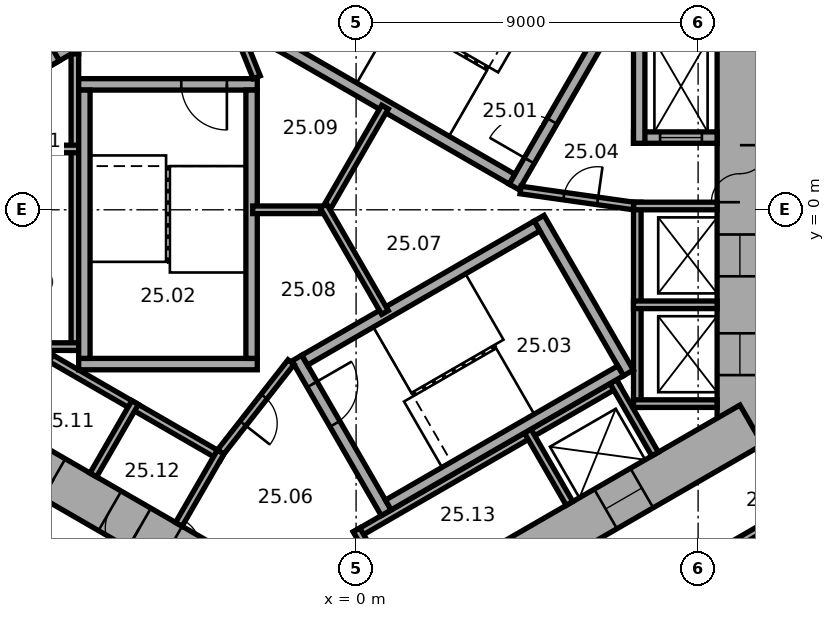
"""IFC4 building model, lengths in metres.
Left out: names, types, materials, properties, quantities, classifications, styles, units other than length and angle.
Written with IfcOpenShell. Run it as: python <this file> out.ifc"""

import sys

from ifc_helpers import new_model, si_unit, direction, frame, frame_2d, origin, place, context, subcontext, project, spatial, rectangle, extrude, element, fill, save


model = new_model("IFC4")
c1 = context("Model", 3, precision=1e-05, world=origin(), true_north=direction((0.0, 1.0)))
c2 = subcontext(c1, "Body", "Model", "MODEL_VIEW")
j1 = project(units=[si_unit("LENGTHUNIT", "METRE"), si_unit("PLANEANGLEUNIT", "RADIAN")], contexts=[c1])
p1 = place(None, origin())
s1 = spatial("IfcSite", under=j1, at=p1, CompositionType="ELEMENT")
p2 = place(p1, origin())
s2 = spatial("IfcBuilding", under=s1, at=p2, CompositionType="ELEMENT")
p3 = place(p2, frame((0.0, 0.0, 106.7)))
s3 = spatial("IfcBuildingStorey", under=s2, at=p3, CompositionType="ELEMENT", Elevation=106.7)
p4 = place(p3, frame((10.1, -6.177, 0.0), z_axis=(0.0, 0.0, 1.0), x_axis=(0.0, 1.0, 0.0)))
e1 = element("IfcWall", 1, at=p4, inside=s3, PredefinedType="SHEAR", context=c2, shape_type="SweptSolid", body=[
    extrude(rectangle(XDim=12.355, YDim=1.2, at=frame_2d((6.177, 0.0))), origin(), (0.0, 0.0, 1.0), 3.3),
])
p5 = place(p4, frame((6.378, 0.0, 0.0)))
e2 = element("IfcOpeningElement", 2, at=p5, cuts=e1, PredefinedType="OPENING", context=c2, shape_type="SweptSolid", body=[
    extrude(rectangle(XDim=1.5, YDim=2.1, at=frame_2d((0.75, 1.05))), frame((0.0, 0.61, 0.0), z_axis=(0.0, -1.0, 0.0), x_axis=(1.0, 0.0, 0.0)), (0.0, 0.0, 1.0), 1.22),
])
p6 = place(p4, frame((1.828, 0.0, 0.0)))
e3 = element("IfcOpeningElement", 3, at=p6, cuts=e1, PredefinedType="OPENING", context=c2, shape_type="SweptSolid", body=[
    extrude(rectangle(XDim=1.1, YDim=2.1, at=frame_2d((0.55, 1.05))), frame((0.0, 0.61, 0.0), z_axis=(0.0, -1.0, 0.0), x_axis=(1.0, 0.0, 0.0)), (0.0, 0.0, 1.0), 1.22),
])
p7 = place(p4, frame((4.427, 0.0, 0.0)))
e4 = element("IfcOpeningElement", 4, at=p7, cuts=e1, PredefinedType="OPENING", context=c2, shape_type="SweptSolid", body=[
    extrude(rectangle(XDim=1.1, YDim=2.1, at=frame_2d((0.55, 1.05))), frame((0.0, 0.61, 0.0), z_axis=(0.0, -1.0, 0.0), x_axis=(1.0, 0.0, 0.0)), (0.0, 0.0, 1.0), 1.22),
])
p8 = place(p3, frame((-10.4, -5.658, 0.0), z_axis=(0.0, 0.0, 1.0), x_axis=(0.866021384402, -0.500006961711, 0.0)))
e5 = element("IfcWall", 5, at=p8, inside=s3, PredefinedType="SHEAR", context=c2, shape_type="SweptSolid", body=[
    extrude(rectangle(XDim=12.355, YDim=1.2, at=frame_2d((6.178, 0.0))), origin(), (0.0, 0.0, 1.0), 3.3),
])
p9 = place(p8, frame((6.378, 0.0, 0.0)))
e6 = element("IfcOpeningElement", 6, at=p9, cuts=e5, PredefinedType="OPENING", context=c2, shape_type="SweptSolid", body=[
    extrude(rectangle(XDim=1.5, YDim=2.1, at=frame_2d((0.75, 1.05))), frame((0.0, 0.61, 0.0), z_axis=(0.0, -1.0, 0.0), x_axis=(1.0, 0.0, 0.0)), (0.0, 0.0, 1.0), 1.22),
])
p10 = place(p8, frame((1.928, 0.0, 0.0)))
e7 = element("IfcOpeningElement", 7, at=p10, cuts=e5, PredefinedType="OPENING", context=c2, shape_type="SweptSolid", body=[
    extrude(rectangle(XDim=0.9, YDim=2.1, at=frame_2d((0.45, 1.05))), frame((0.0, 0.61, 0.0), z_axis=(0.0, -1.0, 0.0), x_axis=(1.0, 0.0, 0.0)), (0.0, 0.0, 1.0), 1.22),
])
p11 = place(p8, frame((4.528, 0.0, 0.0)))
e8 = element("IfcOpeningElement", 8, at=p11, cuts=e5, PredefinedType="OPENING", context=c2, shape_type="SweptSolid", body=[
    extrude(rectangle(XDim=0.9, YDim=2.1, at=frame_2d((0.45, 1.05))), frame((0.0, 0.61, 0.0), z_axis=(0.0, -1.0, 0.0), x_axis=(1.0, 0.0, 0.0)), (0.0, 0.0, 1.0), 1.22),
])
p12 = place(p3, frame((-0.3, -11.836, 0.0), z_axis=(0.0, 0.0, 1.0), x_axis=(0.866021384402, 0.500006961711, 0.0)))
e9 = element("IfcWall", 9, at=p12, inside=s3, PredefinedType="SHEAR", context=c2, shape_type="SweptSolid", body=[
    extrude(rectangle(XDim=12.355, YDim=1.2, at=frame_2d((6.178, 0.0))), origin(), (0.0, 0.0, 1.0), 3.3),
])
p13 = place(p12, frame((4.128, 0.0, 0.0)))
e10 = element("IfcOpeningElement", 10, at=p13, cuts=e9, PredefinedType="OPENING", context=c2, shape_type="SweptSolid", body=[
    extrude(rectangle(XDim=0.9, YDim=2.1, at=frame_2d((0.45, 1.05))), frame((0.0, 0.61, 0.0), z_axis=(0.0, -1.0, 0.0), x_axis=(1.0, 0.0, 0.0)), (0.0, 0.0, 1.0), 1.22),
])
p14 = place(p12, frame((7.928, 0.0, 0.0)))
e11 = element("IfcOpeningElement", 11, at=p14, cuts=e9, PredefinedType="OPENING", context=c2, shape_type="SweptSolid", body=[
    extrude(rectangle(XDim=1.1, YDim=2.1, at=frame_2d((0.55, 1.05))), frame((0.0, 0.61, 0.0), z_axis=(0.0, -1.0, 0.0), x_axis=(1.0, 0.0, 0.0)), (0.0, 0.0, 1.0), 1.22),
])
p15 = place(p3, frame((7.4, -5.2, 0.0), z_axis=(0.0, 0.0, 1.0), x_axis=(0.0, 1.0, 0.0)))
e12 = element("IfcWall", 12, at=p15, inside=s3, PredefinedType="PARTITIONING", context=c2, shape_type="SweptSolid", body=[
    extrude(rectangle(XDim=5.4, YDim=0.2, at=frame_2d((2.7, 0.0))), origin(), (0.0, 0.0, 1.0), 3.05),
])
for number, where, z_axis, x_axis in (
    (13, (7.3, -5.1, 0.0), (0.0, 0.0, 1.0), (1.0, 0.0, 0.0)),
    (14, (7.3, -2.5, 0.0), (0.0, 0.0, 1.0), (1.0, 0.0, 0.0)),
    (15, (7.3, 0.1, 0.0), (0.0, 0.0, 1.0), (1.0, 0.0, 0.0)),
):
    element("IfcWall", number, at=place(p3, frame(where, z_axis=z_axis, x_axis=x_axis)), inside=s3, PredefinedType="PARTITIONING", context=c2, shape_type="SweptSolid", body=[
        extrude(rectangle(XDim=2.2, YDim=0.2, at=frame_2d((1.1, 0.0))), origin(), (0.0, 0.0, 1.0), 3.05),
    ])
p16 = place(p3, frame((-7.4, 4.3, 0.0), z_axis=(0.0, 0.0, 1.0), x_axis=(0.0, -1.0, 0.0)))
e16 = element("IfcWall", 16, at=p16, inside=s3, PredefinedType="PARTITIONING", context=c2, shape_type="SweptSolid", body=[
    extrude(rectangle(XDim=8.0, YDim=0.2, at=frame_2d((4.0, 0.0))), origin(), (0.0, 0.0, 1.0), 3.05),
])
for number, where, z_axis, x_axis in (
    (17, (-7.3, 4.2, 0.0), (0.0, 0.0, 1.0), (-1.0, 0.0, 0.0)),
    (18, (-7.3, 1.6, 0.0), (0.0, 0.0, 1.0), (-1.0, 0.0, 0.0)),
    (19, (-7.3, -3.6, 0.0), (0.0, 0.0, 1.0), (-1.0, 0.0, 0.0)),
):
    element("IfcWall", number, at=place(p3, frame(where, z_axis=z_axis, x_axis=x_axis)), inside=s3, PredefinedType="PARTITIONING", context=c2, shape_type="SweptSolid", body=[
        extrude(rectangle(XDim=2.2, YDim=0.2, at=frame_2d((1.1, 0.0))), origin(), (0.0, 0.0, 1.0), 3.05),
    ])
p17 = place(p3, frame((-8.203, -3.809, 0.0), z_axis=(0.0, 0.0, 1.0), x_axis=(0.866028230842, -0.499995103361, 0.0)))
e20 = element("IfcWall", 20, at=p17, inside=s3, PredefinedType="PARTITIONING", context=c2, shape_type="SweptSolid", body=[
    extrude(rectangle(XDim=5.4, YDim=0.2, at=frame_2d((2.7, 0.0))), origin(), (0.0, 0.0, 1.0), 3.05),
])
for number, where, z_axis, x_axis in (
    (21, (-8.067, -3.772, 0.0), (0.0, 0.0, 1.0), (-0.5, -0.866, 0.0)),
    (22, (-5.815, -5.072, 0.0), (0.0, 0.0, 1.0), (-0.5, -0.866, 0.0)),
):
    element("IfcWall", number, at=place(p3, frame(where, z_axis=z_axis, x_axis=x_axis)), inside=s3, PredefinedType="PARTITIONING", context=c2, shape_type="SweptSolid", body=[
        extrude(rectangle(XDim=2.2, YDim=0.2, at=frame_2d((1.1, 0.0))), origin(), (0.0, 0.0, 1.0), 3.05),
    ])
p18 = place(p3, frame((-3.563, -6.372, 0.0), z_axis=(0.0, 0.0, 1.0), x_axis=(-0.499994660107, -0.866028486751, 0.0)))
e23 = element("IfcWall", 23, at=p18, inside=s3, PredefinedType="PARTITIONING", context=c2, shape_type="SweptSolid", body=[
    extrude(rectangle(XDim=2.2, YDim=0.2, at=frame_2d((1.1, 0.0))), origin(), (0.0, 0.0, 1.0), 3.05),
])
p19 = place(p3, frame((-0.024, -8.559, 0.0), z_axis=(0.0, 0.0, 1.0), x_axis=(0.866026010844, 0.49999894854, 0.0)))
e24 = element("IfcWall", 24, at=p19, inside=s3, PredefinedType="PARTITIONING", context=c2, shape_type="SweptSolid", body=[
    extrude(rectangle(XDim=8.0, YDim=0.2, at=frame_2d((4.0, 0.0))), origin(), (0.0, 0.0, 1.0), 3.05),
])
for number, where, z_axis, x_axis in (
    (25, (0.013, -8.422, 0.0), (0.0, 0.0, 1.0), (0.5, -0.866, 0.0)),
    (26, (4.516, -5.822, 0.0), (0.0, 0.0, 1.0), (0.5, -0.866, 0.0)),
    (27, (6.768, -4.522, 0.0), (0.0, 0.0, 1.0), (0.5, -0.866, 0.0)),
):
    element("IfcWall", number, at=place(p3, frame(where, z_axis=z_axis, x_axis=x_axis)), inside=s3, PredefinedType="PARTITIONING", context=c2, shape_type="SweptSolid", body=[
        extrude(rectangle(XDim=2.2, YDim=0.2, at=frame_2d((1.1, 0.0))), origin(), (0.0, 0.0, 1.0), 3.05),
    ])
p20 = place(p3, frame((4.158, 0.602, 0.0), z_axis=(0.0, 0.0, 1.0), x_axis=(0.499977259774, 0.866038532462, 0.0)))
e28 = element("IfcWall", 28, at=p20, inside=s3, PredefinedType="SHEAR", context=c2, shape_type="SweptSolid", body=[
    extrude(rectangle(XDim=4.7, YDim=0.3, at=frame_2d((2.35, 0.0))), origin(), (0.0, 0.0, 1.0), 3.05),
])
p21 = place(p20, frame((0.8, 0.0, 0.0)))
e29 = element("IfcOpeningElement", 29, at=p21, cuts=e28, PredefinedType="OPENING", context=c2, shape_type="SweptSolid", body=[
    extrude(rectangle(XDim=1.2, YDim=2.1, at=frame_2d((0.6, 1.05))), frame((0.0, 0.16, 0.0), z_axis=(0.0, -1.0, 0.0), x_axis=(1.0, 0.0, 0.0)), (0.0, 0.0, 1.0), 0.32),
])
p22 = place(p3, frame((4.103, 0.807, 0.0), z_axis=(0.0, 0.0, 1.0), x_axis=(-0.866027801685, 0.499995846692, 0.0)))
e30 = element("IfcWall", 30, at=p22, inside=s3, PredefinedType="SHEAR", context=c2, shape_type="SweptSolid", body=[
    extrude(rectangle(XDim=7.06, YDim=0.3, at=frame_2d((3.53, 0.0))), origin(), (0.0, 0.0, 1.0), 3.05),
])
p23 = place(p3, frame((-2.6, 3.3, 0.0), z_axis=(0.0, 0.0, 1.0), x_axis=(-1.0, 0.0, 0.0)))
e31 = element("IfcWall", 31, at=p23, inside=s3, PredefinedType="SHEAR", context=c2, shape_type="SweptSolid", body=[
    extrude(rectangle(XDim=4.7, YDim=0.3, at=frame_2d((2.35, 0.0))), origin(), (0.0, 0.0, 1.0), 3.05),
])
p24 = place(p23, frame((0.8, 0.0, 0.0)))
e32 = element("IfcOpeningElement", 32, at=p24, cuts=e31, PredefinedType="OPENING", context=c2, shape_type="SweptSolid", body=[
    extrude(rectangle(XDim=1.2, YDim=2.1, at=frame_2d((0.6, 1.05))), frame((0.0, 0.16, 0.0), z_axis=(0.0, -1.0, 0.0), x_axis=(1.0, 0.0, 0.0)), (0.0, 0.0, 1.0), 0.32),
])
p25 = place(p3, frame((-2.6, -4.06, 0.0), z_axis=(0.0, 0.0, 1.0), x_axis=(-1.0, 0.0, 0.0)))
e33 = element("IfcWall", 33, at=p25, inside=s3, PredefinedType="SHEAR", context=c2, shape_type="SweptSolid", body=[
    extrude(rectangle(XDim=4.7, YDim=0.3, at=frame_2d((2.35, 0.0))), origin(), (0.0, 0.0, 1.0), 3.05),
])
for number, where, z_axis, x_axis in (
    (34, (-2.75, 3.15, 0.0), (0.0, 0.0, 1.0), (0.0, -1.0, 0.0)),
    (35, (-7.15, 3.15, 0.0), (0.0, 0.0, 1.0), (0.0, -1.0, 0.0)),
):
    element("IfcWall", number, at=place(p3, frame(where, z_axis=z_axis, x_axis=x_axis)), inside=s3, PredefinedType="SHEAR", context=c2, shape_type="SweptSolid", body=[
        extrude(rectangle(XDim=7.06, YDim=0.3, at=frame_2d((3.53, 0.0))), origin(), (0.0, 0.0, 1.0), 3.05),
    ])
p26 = place(p3, frame((-1.558, -3.902, 0.0), z_axis=(0.0, 0.0, 1.0), x_axis=(0.499977259774, -0.866038532462, 0.0)))
e36 = element("IfcWall", 36, at=p26, inside=s3, PredefinedType="SHEAR", context=c2, shape_type="SweptSolid", body=[
    extrude(rectangle(XDim=4.7, YDim=0.3, at=frame_2d((2.35, 0.0))), origin(), (0.0, 0.0, 1.0), 3.05),
])
p27 = place(p26, frame((0.8, 0.0, 0.0)))
e37 = element("IfcOpeningElement", 37, at=p27, cuts=e36, PredefinedType="OPENING", context=c2, shape_type="SweptSolid", body=[
    extrude(rectangle(XDim=1.2, YDim=2.1, at=frame_2d((0.6, 1.05))), frame((0.0, 0.16, 0.0), z_axis=(0.0, -1.0, 0.0), x_axis=(1.0, 0.0, 0.0)), (0.0, 0.0, 1.0), 0.32),
])
p28 = place(p3, frame((4.816, -0.222, 0.0), z_axis=(0.0, 0.0, 1.0), x_axis=(0.499977259774, -0.866038532462, 0.0)))
e38 = element("IfcWall", 38, at=p28, inside=s3, PredefinedType="SHEAR", context=c2, shape_type="SweptSolid", body=[
    extrude(rectangle(XDim=4.7, YDim=0.3, at=frame_2d((2.35, 0.0))), origin(), (0.0, 0.0, 1.0), 3.05),
])
for number, where, z_axis, x_axis in (
    (39, (-1.353, -3.957, 0.0), (0.0, 0.0, 1.0), (0.866, 0.5, 0.0)),
    (40, (0.847, -7.767, 0.0), (0.0, 0.0, 1.0), (0.866, 0.5, 0.0)),
):
    element("IfcWall", number, at=place(p3, frame(where, z_axis=z_axis, x_axis=x_axis)), inside=s3, PredefinedType="SHEAR", context=c2, shape_type="SweptSolid", body=[
        extrude(rectangle(XDim=7.06, YDim=0.3, at=frame_2d((3.53, 0.0))), origin(), (0.0, 0.0, 1.0), 3.05),
    ])
p29 = place(p3, frame((7.3, 1.9, 0.0), z_axis=(0.0, 0.0, 1.0), x_axis=(1.0, 0.0, 0.0)))
e41 = element("IfcWall", 41, at=p29, inside=s3, PredefinedType="SHEAR", context=c2, shape_type="SweptSolid", body=[
    extrude(rectangle(XDim=2.2, YDim=0.3, at=frame_2d((1.1, 0.0))), origin(), (0.0, 0.0, 1.0), 3.05),
])
p30 = place(p29, frame((0.7, 0.0, 0.0)))
e42 = element("IfcOpeningElement", 42, at=p30, cuts=e41, PredefinedType="OPENING", context=c2, shape_type="SweptSolid", body=[
    extrude(rectangle(XDim=1.1, YDim=2.1, at=frame_2d((0.55, 1.05))), frame((0.0, 0.16, 0.0), z_axis=(0.0, -1.0, 0.0), x_axis=(1.0, 0.0, 0.0)), (0.0, 0.0, 1.0), 0.32),
])
p31 = place(p3, frame((7.45, 1.75, 0.0), z_axis=(0.0, 0.0, 1.0), x_axis=(0.0, 1.0, 0.0)))
e43 = element("IfcWall", 43, at=p31, inside=s3, PredefinedType="SHEAR", context=c2, shape_type="SweptSolid", body=[
    extrude(rectangle(XDim=3.35, YDim=0.3, at=frame_2d((1.675, 0.0))), origin(), (0.0, 0.0, 1.0), 3.05),
])
p32 = place(p3, frame((4.327, 0.521, 0.0), z_axis=(0.0, 0.0, 1.0), x_axis=(0.990124376366, -0.14019172346, 0.0)))
e44 = element("IfcWall", 44, at=p32, inside=s3, PredefinedType="PARTITIONING", context=c2, shape_type="SweptSolid", body=[
    extrude(rectangle(XDim=3.002, YDim=0.2, at=frame_2d((1.501, 0.0))), origin(), (0.0, 0.0, 1.0), 3.05),
])
p33 = place(p32, frame((1.15, 0.0, 0.0)))
e45 = element("IfcOpeningElement", 45, at=p33, cuts=e44, PredefinedType="OPENING", context=c2, shape_type="SweptSolid", body=[
    extrude(rectangle(XDim=0.9, YDim=2.1, at=frame_2d((0.45, 1.05))), frame((0.0, 0.11, 0.0), z_axis=(0.0, -1.0, 0.0), x_axis=(1.0, 0.0, 0.0)), (0.0, 0.0, 1.0), 0.22),
])
p34 = place(p3, frame((-5.24, 5.577, 0.0), z_axis=(0.0, 0.0, 1.0), x_axis=(-0.866014461049, -0.500018952895, 0.0)))
e46 = element("IfcWall", 46, at=p34, inside=s3, PredefinedType="SHEAR", context=c2, shape_type="SweptSolid", body=[
    extrude(rectangle(XDim=3.35, YDim=0.3, at=frame_2d((1.675, 0.0))), origin(), (0.0, 0.0, 1.0), 3.05),
])
p35 = place(p3, frame((-7.937, 3.847, 0.0), z_axis=(0.0, 0.0, 1.0), x_axis=(-0.50002983664, 0.866008176907, 0.0)))
e47 = element("IfcWall", 47, at=p35, inside=s3, PredefinedType="SHEAR", context=c2, shape_type="SweptSolid", body=[
    extrude(rectangle(XDim=2.2, YDim=0.3, at=frame_2d((1.1, 0.0))), origin(), (0.0, 0.0, 1.0), 3.05),
])
p36 = place(p3, frame((-2.615, 3.487, 0.0), z_axis=(0.0, 0.0, 1.0), x_axis=(-0.373576831041, 0.92759924068, 0.0)))
e48 = element("IfcWall", 48, at=p36, inside=s3, PredefinedType="PARTITIONING", context=c2, shape_type="SweptSolid", body=[
    extrude(rectangle(XDim=3.002, YDim=0.2, at=frame_2d((1.501, 0.0))), origin(), (0.0, 0.0, 1.0), 3.05),
])
p37 = place(p36, frame((1.15, 0.0, 0.0)))
e49 = element("IfcOpeningElement", 49, at=p37, cuts=e48, PredefinedType="OPENING", context=c2, shape_type="SweptSolid", body=[
    extrude(rectangle(XDim=0.9, YDim=2.1, at=frame_2d((0.45, 1.05))), frame((0.0, 0.11, 0.0), z_axis=(0.0, -1.0, 0.0), x_axis=(1.0, 0.0, 0.0)), (0.0, 0.0, 1.0), 0.22),
])
p38 = place(p3, frame((-1.712, -4.008, 0.0), z_axis=(0.0, 0.0, 1.0), x_axis=(-0.616549420702, -0.787316208287, 0.0)))
e50 = element("IfcWall", 50, at=p38, inside=s3, PredefinedType="PARTITIONING", context=c2, shape_type="SweptSolid", body=[
    extrude(rectangle(XDim=3.002, YDim=0.2, at=frame_2d((1.501, 0.0))), origin(), (0.0, 0.0, 1.0), 3.05),
])
p39 = place(p38, frame((1.15, 0.0, 0.0)))
e51 = element("IfcOpeningElement", 51, at=p39, cuts=e50, PredefinedType="OPENING", context=c2, shape_type="SweptSolid", body=[
    extrude(rectangle(XDim=0.9, YDim=2.1, at=frame_2d((0.45, 1.05))), frame((0.0, 0.11, 0.0), z_axis=(0.0, -1.0, 0.0), x_axis=(1.0, 0.0, 0.0)), (0.0, 0.0, 1.0), 0.22),
])
p40 = place(p3, frame((-0.68, 0.0, 0.0), z_axis=(0.0, 0.0, 1.0), x_axis=(-1.0, 0.0, 0.0)))
e52 = element("IfcWall", 52, at=p40, inside=s3, PredefinedType="PARTITIONING", context=c2, shape_type="SweptSolid", body=[
    extrude(rectangle(XDim=2.04, YDim=0.2, at=frame_2d((1.02, 0.0))), origin(), (0.0, 0.0, 1.0), 3.05),
])
for number, where, z_axis, x_axis in (
    (53, (-0.86, -0.104, 0.0), (0.0, 0.0, 1.0), (0.5, 0.866, 0.0)),
    (54, (-0.86, 0.104, 0.0), (0.0, 0.0, 1.0), (0.5, -0.866, 0.0)),
):
    element("IfcWall", number, at=place(p3, frame(where, z_axis=z_axis, x_axis=x_axis)), inside=s3, PredefinedType="PARTITIONING", context=c2, shape_type="SweptSolid", body=[
        extrude(rectangle(XDim=3.24, YDim=0.2, at=frame_2d((1.62, 0.0))), origin(), (0.0, 0.0, 1.0), 3.05),
    ])
p41 = place(p3, frame((-11.615, -7.843, 0.0), z_axis=(0.0, 0.0, 1.0), x_axis=(0.866026466995, -0.499998158461, 0.0)))
e55 = element("IfcWall", 55, at=p41, inside=s3, PredefinedType="PARTITIONING", context=c2, shape_type="SweptSolid", body=[
    extrude(rectangle(XDim=12.315, YDim=0.2, at=frame_2d((6.158, 0.0))), origin(), (0.0, 0.0, 1.0), 3.05),
])
p42 = place(p41, frame((5.983, 0.0, 0.0)))
e56 = element("IfcOpeningElement", 56, at=p42, cuts=e55, PredefinedType="OPENING", context=c2, shape_type="SweptSolid", body=[
    extrude(rectangle(XDim=0.9, YDim=2.1, at=frame_2d((0.45, 1.05))), frame((0.0, 0.11, 0.0), z_axis=(0.0, -1.0, 0.0), x_axis=(1.0, 0.0, 0.0)), (0.0, 0.0, 1.0), 0.22),
])
p43 = place(p41, frame((10.229, 0.0, 0.0)))
e57 = element("IfcOpeningElement", 57, at=p43, cuts=e55, PredefinedType="OPENING", context=c2, shape_type="SweptSolid", body=[
    extrude(rectangle(XDim=0.9, YDim=2.1, at=frame_2d((0.45, 1.05))), frame((0.0, 0.11, 0.0), z_axis=(0.0, -1.0, 0.0), x_axis=(1.0, 0.0, 0.0)), (0.0, 0.0, 1.0), 0.22),
])
p44 = place(p3, frame((9.852, -8.861, 0.0), z_axis=(0.0, 0.0, 1.0), x_axis=(0.866013291437, 0.500020978615, 0.0)))
e58 = element("IfcWall", 58, at=p44, inside=s3, PredefinedType="PARTITIONING", context=c2, shape_type="SweptSolid", body=[
    extrude(rectangle(XDim=2.077, YDim=0.2, at=frame_2d((1.038, 0.0))), origin(), (0.0, 0.0, 1.0), 3.05),
])
p45 = place(p5, origin())
e59 = element("IfcDoor", 59, at=p45, inside=s3, OperationType="DOUBLE_DOOR_SINGLE_SWING", PredefinedType="DOOR", context=c2, shape_type="SweptSolid", body=[
    extrude(rectangle(XDim=1.5, YDim=2.1, at=frame_2d((0.75, 1.05))), frame((0.0, 0.025, 0.0), z_axis=(0.0, -1.0, 0.0), x_axis=(1.0, 0.0, 0.0)), (0.0, 0.0, 1.0), 0.05),
])
fill(e2, e59)
p46 = place(p21, origin())
e60 = element("IfcDoor", 60, at=p46, inside=s3, OperationType="SINGLE_SWING_RIGHT", PredefinedType="DOOR", context=c2, shape_type="SweptSolid", body=[
    extrude(rectangle(XDim=1.2, YDim=2.1, at=frame_2d((0.6, 1.05))), frame((0.0, 0.025, 0.0), z_axis=(0.0, -1.0, 0.0), x_axis=(1.0, 0.0, 0.0)), (0.0, 0.0, 1.0), 0.05),
])
fill(e29, e60)
p47 = place(p24, origin())
e61 = element("IfcDoor", 61, at=p47, inside=s3, OperationType="SINGLE_SWING_RIGHT", PredefinedType="DOOR", context=c2, shape_type="SweptSolid", body=[
    extrude(rectangle(XDim=1.2, YDim=2.1, at=frame_2d((0.6, 1.05))), frame((0.0, 0.025, 0.0), z_axis=(0.0, -1.0, 0.0), x_axis=(1.0, 0.0, 0.0)), (0.0, 0.0, 1.0), 0.05),
])
fill(e32, e61)
p48 = place(p27, origin())
e62 = element("IfcDoor", 62, at=p48, inside=s3, OperationType="SINGLE_SWING_RIGHT", PredefinedType="DOOR", context=c2, shape_type="SweptSolid", body=[
    extrude(rectangle(XDim=1.2, YDim=2.1, at=frame_2d((0.6, 1.05))), frame((0.0, 0.025, 0.0), z_axis=(0.0, -1.0, 0.0), x_axis=(1.0, 0.0, 0.0)), (0.0, 0.0, 1.0), 0.05),
])
fill(e37, e62)
p49 = place(p33, origin())
e63 = element("IfcDoor", 63, at=p49, inside=s3, OperationType="SINGLE_SWING_LEFT", PredefinedType="DOOR", context=c2, shape_type="SweptSolid", body=[
    extrude(rectangle(XDim=0.9, YDim=2.1, at=frame_2d((0.45, 1.05))), frame((0.0, 0.025, 0.0), z_axis=(0.0, -1.0, 0.0), x_axis=(1.0, 0.0, 0.0)), (0.0, 0.0, 1.0), 0.05),
])
fill(e45, e63)
p50 = place(p39, origin())
e64 = element("IfcDoor", 64, at=p50, inside=s3, OperationType="SINGLE_SWING_LEFT", PredefinedType="DOOR", context=c2, shape_type="SweptSolid", body=[
    extrude(rectangle(XDim=0.9, YDim=2.1, at=frame_2d((0.45, 1.05))), frame((0.0, 0.025, 0.0), z_axis=(0.0, -1.0, 0.0), x_axis=(1.0, 0.0, 0.0)), (0.0, 0.0, 1.0), 0.05),
])
fill(e51, e64)
p51 = place(p10, origin())
e65 = element("IfcDoor", 65, at=p51, inside=s3, OperationType="SINGLE_SWING_LEFT", PredefinedType="DOOR", context=c2, shape_type="SweptSolid", body=[
    extrude(rectangle(XDim=0.9, YDim=2.1, at=frame_2d((0.45, 1.05))), frame((0.0, 0.025, 0.0), z_axis=(0.0, -1.0, 0.0), x_axis=(1.0, 0.0, 0.0)), (0.0, 0.0, 1.0), 0.05),
])
fill(e7, e65)
p52 = place(p11, origin())
e66 = element("IfcDoor", 66, at=p52, inside=s3, OperationType="SINGLE_SWING_LEFT", PredefinedType="DOOR", context=c2, shape_type="SweptSolid", body=[
    extrude(rectangle(XDim=0.9, YDim=2.1, at=frame_2d((0.45, 1.05))), frame((0.0, 0.025, 0.0), z_axis=(0.0, -1.0, 0.0), x_axis=(1.0, 0.0, 0.0)), (0.0, 0.0, 1.0), 0.05),
])
fill(e8, e66)
p53 = place(p30, origin())
e67 = element("IfcDoor", 67, at=p53, inside=s3, OperationType="DOUBLE_DOOR_SLIDING", PredefinedType="DOOR", context=c2, shape_type="SweptSolid", body=[
    extrude(rectangle(XDim=1.1, YDim=2.1, at=frame_2d((0.55, 1.05))), frame((0.0, 0.025, 0.0), z_axis=(0.0, -1.0, 0.0), x_axis=(1.0, 0.0, 0.0)), (0.0, 0.0, 1.0), 0.05),
])
fill(e42, e67)
p54 = place(p6, origin())
e68 = element("IfcDoor", 68, at=p54, inside=s3, OperationType="DOUBLE_DOOR_SLIDING", PredefinedType="DOOR", context=c2, shape_type="SweptSolid", body=[
    extrude(rectangle(XDim=1.1, YDim=2.1, at=frame_2d((0.55, 1.05))), frame((0.0, 0.025, 0.0), z_axis=(0.0, -1.0, 0.0), x_axis=(1.0, 0.0, 0.0)), (0.0, 0.0, 1.0), 0.05),
])
fill(e3, e68)
p55 = place(p7, origin())
e69 = element("IfcDoor", 69, at=p55, inside=s3, OperationType="DOUBLE_DOOR_SLIDING", PredefinedType="DOOR", context=c2, shape_type="SweptSolid", body=[
    extrude(rectangle(XDim=1.1, YDim=2.1, at=frame_2d((0.55, 1.05))), frame((0.0, 0.025, 0.0), z_axis=(0.0, -1.0, 0.0), x_axis=(1.0, 0.0, 0.0)), (0.0, 0.0, 1.0), 0.05),
])
fill(e4, e69)
p56 = place(p14, origin())
e70 = element("IfcDoor", 70, at=p56, inside=s3, OperationType="DOUBLE_DOOR_SLIDING", PredefinedType="DOOR", context=c2, shape_type="SweptSolid", body=[
    extrude(rectangle(XDim=1.1, YDim=2.1, at=frame_2d((0.55, 1.05))), frame((0.0, 0.025, 0.0), z_axis=(0.0, -1.0, 0.0), x_axis=(1.0, 0.0, 0.0)), (0.0, 0.0, 1.0), 0.05),
])
fill(e11, e70)
save(model, sys.argv[1])
